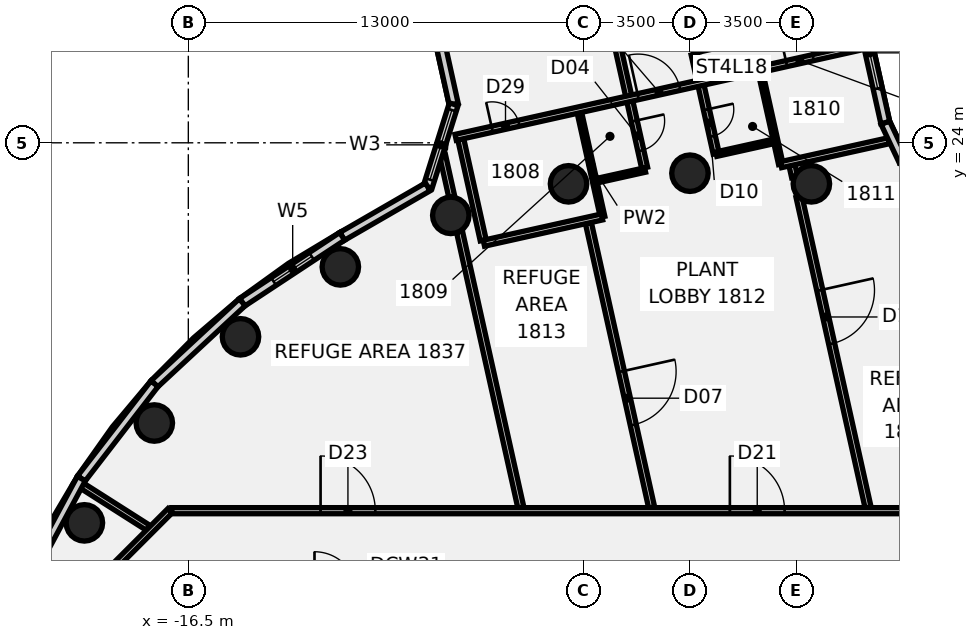
"""IFC4 building model, lengths in metres.
Left out: names, types, materials, properties, quantities, classifications, styles, units other than length and angle.
Written with IfcOpenShell. Run it as: python <this file> out.ifc"""

import sys

from ifc_helpers import new_model, si_unit, direction, frame, frame_2d, origin, origin_2d, place, context, subcontext, project, spatial, rectangle, circle, extrude, element, fill, save


model = new_model("IFC4")
c1 = context("Model", 3, precision=1e-05, world=origin(), true_north=direction((0.0, 1.0)))
c2 = subcontext(c1, "Body", "Model", "MODEL_VIEW")
j1 = project(units=[si_unit("LENGTHUNIT", "METRE"), si_unit("PLANEANGLEUNIT", "RADIAN")], contexts=[c1])
p1 = place(None, origin())
s1 = spatial("IfcSite", under=j1, at=p1, CompositionType="ELEMENT")
p2 = place(p1, origin())
s2 = spatial("IfcBuilding", under=s1, at=p2, CompositionType="ELEMENT")
p3 = place(p2, frame((0.0, 0.0, 79.0)))
s3 = spatial("IfcBuildingStorey", under=s2, at=p3, CompositionType="ELEMENT", Elevation=79.0)
for number, where, z_axis, x_axis in (
    (1, (3.994, 22.651, -0.18), (0.0, 0.0, 1.0), (1.0, 0.0, 0.0)),
    (2, (0.0, 23.0, -0.18), (0.0, 0.0, 1.0), (1.0, 0.0, 0.0)),
    (3, (-3.994, 22.651, -0.18), (0.0, 0.0, 1.0), (1.0, 0.0, 0.0)),
    (4, (-7.866, 21.613, -0.18), (0.0, 0.0, 1.0), (1.0, 0.0, 0.0)),
    (5, (-11.5, 19.919, -0.18), (0.0, 0.0, 1.0), (1.0, 0.0, 0.0)),
    (6, (-14.784, 17.619, -0.18), (0.0, 0.0, 1.0), (1.0, 0.0, 0.0)),
    (7, (-17.619, 14.784, -0.18), (0.0, 0.0, 1.0), (1.0, 0.0, 0.0)),
    (8, (-19.919, 11.5, -0.18), (0.0, 0.0, 1.0), (1.0, 0.0, 0.0)),
):
    element("IfcColumn", number, at=place(p3, frame(where, z_axis=z_axis, x_axis=x_axis)), inside=s3, PredefinedType="COLUMN", context=c2, shape_type="SweptSolid", body=[
        extrude(circle(Radius=0.6, at=origin_2d()), origin(), (0.0, 0.0, 1.0), 4.54),
    ])
p4 = place(p3, frame((-8.14, 23.592, 0.0), z_axis=(0.0, 0.0, 1.0), x_axis=(0.21709529859, -0.976150414296, 0.0)))
e9 = element("IfcWall", 9, at=p4, inside=s3, PredefinedType="PARTITIONING", context=c2, shape_type="SweptSolid", body=[
    extrude(rectangle(XDim=1.411, YDim=0.2, at=frame_2d((0.706, 0.0))), origin(), (0.0, 0.0, 1.0), 3.66),
])
p5 = place(p3, frame((-7.581, 21.079, 0.0), z_axis=(0.0, 0.0, 1.0), x_axis=(0.217055556544, -0.976159252055, 0.0)))
e10 = element("IfcWall", 10, at=p5, inside=s3, PredefinedType="PARTITIONING", context=c2, shape_type="SweptSolid", body=[
    extrude(rectangle(XDim=9.299, YDim=0.2, at=frame_2d((4.649, 0.0))), origin(), (0.0, 0.0, 1.0), 3.66),
])
p6 = place(p3, frame((-7.538, 24.115, 0.0), z_axis=(0.0, 0.0, 1.0), x_axis=(0.216877248521, -0.976198882951, 0.0)))
e11 = element("IfcWall", 11, at=p6, inside=s3, PredefinedType="PARTITIONING", context=c2, shape_type="SweptSolid", body=[
    extrude(rectangle(XDim=3.401, YDim=0.2, at=frame_2d((1.7, 0.0))), origin(), (0.0, 0.0, 1.0), 3.66),
])
p7 = place(p3, frame((-4.905, 38.529, 0.0), z_axis=(0.0, 0.0, 1.0), x_axis=(0.217093198674, -0.976150881314, 0.0)))
e12 = element("IfcWall", 12, at=p7, inside=s3, PredefinedType="PARTITIONING", context=c2, shape_type="SweptSolid", body=[
    extrude(rectangle(XDim=15.725, YDim=0.2, at=frame_2d((7.863, 0.0))), origin(), (0.0, 0.0, 1.0), 3.66),
])
p8 = place(p7, frame((14.15, 0.0, 0.0)))
e13 = element("IfcOpeningElement", 13, at=p8, cuts=e12, PredefinedType="OPENING", context=c2, shape_type="SweptSolid", body=[
    extrude(rectangle(XDim=1.0, YDim=2.1, at=frame_2d((0.5, 1.05))), frame((0.0, 0.11, 0.0), z_axis=(0.0, -1.0, 0.0), x_axis=(1.0, 0.0, 0.0)), (0.0, 0.0, 1.0), 0.22),
])
p9 = place(p7, frame((7.1, 0.0, 0.0)))
e14 = element("IfcOpeningElement", 14, at=p9, cuts=e12, PredefinedType="OPENING", context=c2, shape_type="SweptSolid", body=[
    extrude(rectangle(XDim=1.4, YDim=2.1, at=frame_2d((0.7, 1.05))), frame((0.0, 0.11, 0.0), z_axis=(0.0, -1.0, 0.0), x_axis=(1.0, 0.0, 0.0)), (0.0, 0.0, 1.0), 0.22),
])
p10 = place(p7, frame((2.0, 0.0, 0.0)))
e15 = element("IfcOpeningElement", 15, at=p10, cuts=e12, PredefinedType="OPENING", context=c2, shape_type="SweptSolid", body=[
    extrude(rectangle(XDim=1.4, YDim=2.1, at=frame_2d((0.7, 1.05))), frame((0.0, 0.11, 0.0), z_axis=(0.0, -1.0, 0.0), x_axis=(1.0, 0.0, 0.0)), (0.0, 0.0, 1.0), 0.22),
])
p11 = place(p3, frame((-3.634, 24.982, 0.0), z_axis=(0.0, 0.0, 1.0), x_axis=(0.217211102437, -0.976124652377, 0.0)))
e16 = element("IfcWall", 16, at=p11, inside=s3, PredefinedType="PARTITIONING", context=c2, shape_type="SweptSolid", body=[
    extrude(rectangle(XDim=3.5, YDim=0.15, at=frame_2d((1.75, 0.0))), origin(), (0.0, 0.0, 1.0), 3.66),
])
p12 = place(p3, frame((-3.34, 21.359, 0.0), z_axis=(0.0, 0.0, 1.0), x_axis=(0.217054509475, -0.976159484878, 0.0)))
e17 = element("IfcWall", 17, at=p12, inside=s3, PredefinedType="PARTITIONING", context=c2, shape_type="SweptSolid", body=[
    extrude(rectangle(XDim=9.585, YDim=0.2, at=frame_2d((4.793, 0.0))), origin(), (0.0, 0.0, 1.0), 3.66),
])
p13 = place(p12, frame((5.0, 0.0, 0.0)))
e18 = element("IfcOpeningElement", 18, at=p13, cuts=e17, PredefinedType="OPENING", context=c2, shape_type="SweptSolid", body=[
    extrude(rectangle(XDim=1.8, YDim=2.1, at=frame_2d((0.9, 1.05))), frame((0.0, 0.11, 0.0), z_axis=(0.0, -1.0, 0.0), x_axis=(1.0, 0.0, 0.0)), (0.0, 0.0, 1.0), 0.22),
])
p14 = place(p3, frame((0.138, 26.907, 0.0), z_axis=(0.0, 0.0, 1.0), x_axis=(0.217031075357, -0.976164695289, 0.0)))
e19 = element("IfcWall", 19, at=p14, inside=s3, PredefinedType="PARTITIONING", context=c2, shape_type="SweptSolid", body=[
    extrude(rectangle(XDim=3.34, YDim=0.2, at=frame_2d((1.67, 0.0))), origin(), (0.0, 0.0, 1.0), 3.66),
])
p15 = place(p14, frame((1.86, 0.0, 0.0)))
e20 = element("IfcOpeningElement", 20, at=p15, cuts=e19, PredefinedType="OPENING", context=c2, shape_type="SweptSolid", body=[
    extrude(rectangle(XDim=0.9, YDim=2.1, at=frame_2d((0.45, 1.05))), frame((0.0, 0.11, 0.0), z_axis=(0.0, -1.0, 0.0), x_axis=(1.0, 0.0, 0.0)), (0.0, 0.0, 1.0), 0.22),
])
p16 = place(p3, frame((2.32, 26.311, 0.0), z_axis=(0.0, 0.0, 1.0), x_axis=(0.216662333141, -0.976246604807, 0.0)))
e21 = element("IfcWall", 21, at=p16, inside=s3, PredefinedType="PARTITIONING", context=c2, shape_type="SweptSolid", body=[
    extrude(rectangle(XDim=3.085, YDim=0.15, at=frame_2d((1.542, 0.0))), origin(), (0.0, 0.0, 1.0), 3.66),
])
p17 = place(p3, frame((3.357, 23.258, 0.0), z_axis=(0.0, 0.0, 1.0), x_axis=(0.216995545152, -0.976172594055, 0.0)))
e22 = element("IfcWall", 22, at=p17, inside=s3, PredefinedType="PARTITIONING", context=c2, shape_type="SweptSolid", body=[
    extrude(rectangle(XDim=0.397, YDim=0.2, at=frame_2d((0.199, 0.0))), origin(), (0.0, 0.0, 1.0), 3.66),
])
p18 = place(p3, frame((3.587, 22.225, 0.0), z_axis=(0.0, 0.0, 1.0), x_axis=(0.21703911185, -0.976162908498, 0.0)))
e23 = element("IfcWall", 23, at=p18, inside=s3, PredefinedType="PARTITIONING", context=c2, shape_type="SweptSolid", body=[
    extrude(rectangle(XDim=10.468, YDim=0.2, at=frame_2d((5.234, 0.0))), origin(), (0.0, 0.0, 1.0), 3.66),
])
p19 = place(p18, frame((3.15, 0.0, 0.0)))
e24 = element("IfcOpeningElement", 24, at=p19, cuts=e23, PredefinedType="OPENING", context=c2, shape_type="SweptSolid", body=[
    extrude(rectangle(XDim=1.8, YDim=2.1, at=frame_2d((0.9, 1.05))), frame((0.0, 0.11, 0.0), z_axis=(0.0, -1.0, 0.0), x_axis=(1.0, 0.0, 0.0)), (0.0, 0.0, 1.0), 0.22),
])
p20 = place(p3, frame((-20.233, 12.872, 0.0), z_axis=(0.0, 0.0, 1.0), x_axis=(0.843541681932, -0.537063712089, 0.0)))
e25 = element("IfcWall", 25, at=p20, inside=s3, PredefinedType="PARTITIONING", context=c2, shape_type="SweptSolid", body=[
    extrude(rectangle(XDim=2.854, YDim=0.2, at=frame_2d((1.427, 0.0))), origin(), (0.0, 0.0, 1.0), 3.66),
])
p21 = place(p3, frame((-17.045, 11.9, 0.0), z_axis=(0.0, 0.0, 1.0), x_axis=(1.0, 0.0, 0.0)))
e26 = element("IfcWall", 26, at=p21, inside=s3, PredefinedType="PARTITIONING", context=c2, shape_type="SweptSolid", body=[
    extrude(rectangle(XDim=34.145, YDim=0.2, at=frame_2d((17.073, 0.0))), origin(), (0.0, 0.0, 1.0), 3.66),
])
p22 = place(p21, frame((18.358, 0.0, 0.0)))
e27 = element("IfcOpeningElement", 27, at=p22, cuts=e26, PredefinedType="OPENING", context=c2, shape_type="SweptSolid", body=[
    extrude(rectangle(XDim=1.8, YDim=2.1, at=frame_2d((0.9, 1.05))), frame((0.0, 0.11, 0.0), z_axis=(0.0, -1.0, 0.0), x_axis=(1.0, 0.0, 0.0)), (0.0, 0.0, 1.0), 0.22),
])
p23 = place(p21, frame((28.877, 0.0, 0.0)))
e28 = element("IfcOpeningElement", 28, at=p23, cuts=e26, PredefinedType="OPENING", context=c2, shape_type="SweptSolid", body=[
    extrude(rectangle(XDim=1.8, YDim=2.1, at=frame_2d((0.9, 1.05))), frame((0.0, 0.11, 0.0), z_axis=(0.0, -1.0, 0.0), x_axis=(1.0, 0.0, 0.0)), (0.0, 0.0, 1.0), 0.22),
])
p24 = place(p21, frame((4.895, 0.0, 0.0)))
e29 = element("IfcOpeningElement", 29, at=p24, cuts=e26, PredefinedType="OPENING", context=c2, shape_type="SweptSolid", body=[
    extrude(rectangle(XDim=1.8, YDim=2.1, at=frame_2d((0.9, 1.05))), frame((0.0, 0.11, 0.0), z_axis=(0.0, -1.0, 0.0), x_axis=(1.0, 0.0, 0.0)), (0.0, 0.0, 1.0), 0.22),
])
p25 = place(p3, frame((-7.707, 24.179, 0.0), z_axis=(0.0, 0.0, 1.0), x_axis=(0.976033065583, 0.21762227572, 0.0)))
e30 = element("IfcWall", 30, at=p25, inside=s3, PredefinedType="PARTITIONING", context=c2, shape_type="SweptSolid", body=[
    extrude(rectangle(XDim=13.75, YDim=0.2, at=frame_2d((6.875, 0.0))), origin(), (0.0, 0.0, 1.0), 3.66),
])
p26 = place(p25, frame((6.151, 0.0, 0.0)))
e31 = element("IfcOpeningElement", 31, at=p26, cuts=e30, PredefinedType="OPENING", context=c2, shape_type="SweptSolid", body=[
    extrude(rectangle(XDim=1.4, YDim=2.1, at=frame_2d((0.7, 1.05))), frame((0.0, 0.11, 0.0), z_axis=(0.0, -1.0, 0.0), x_axis=(1.0, 0.0, 0.0)), (0.0, 0.0, 1.0), 0.22),
])
p27 = place(p25, frame((1.23, 0.0, 0.0)))
e32 = element("IfcOpeningElement", 32, at=p27, cuts=e30, PredefinedType="OPENING", context=c2, shape_type="SweptSolid", body=[
    extrude(rectangle(XDim=0.9, YDim=2.1, at=frame_2d((0.45, 1.05))), frame((0.0, 0.11, 0.0), z_axis=(0.0, -1.0, 0.0), x_axis=(1.0, 0.0, 0.0)), (0.0, 0.0, 1.0), 0.22),
])
p28 = place(p25, frame((11.151, 0.0, 0.0)))
e33 = element("IfcOpeningElement", 33, at=p28, cuts=e30, PredefinedType="OPENING", context=c2, shape_type="SweptSolid", body=[
    extrude(rectangle(XDim=0.9, YDim=2.1, at=frame_2d((0.45, 1.05))), frame((0.0, 0.11, 0.0), z_axis=(0.0, -1.0, 0.0), x_axis=(1.0, 0.0, 0.0)), (0.0, 0.0, 1.0), 0.22),
])
p29 = place(p3, frame((-6.779, 20.697, 0.0), z_axis=(0.0, 0.0, 1.0), x_axis=(0.976146636843, 0.217112282887, 0.0)))
e34 = element("IfcWall", 34, at=p29, inside=s3, PredefinedType="PARTITIONING", context=c2, shape_type="SweptSolid", body=[
    extrude(rectangle(XDim=3.981, YDim=0.2, at=frame_2d((1.99, 0.0))), origin(), (0.0, 0.0, 1.0), 3.66),
])
p30 = place(p3, frame((-3.057, 22.754, 0.0), z_axis=(0.0, 0.0, 1.0), x_axis=(0.976179969389, 0.216962363933, 0.0)))
e35 = element("IfcWall", 35, at=p30, inside=s3, PredefinedType="PARTITIONING", context=c2, shape_type="SweptSolid", body=[
    extrude(rectangle(XDim=1.62, YDim=0.15, at=frame_2d((0.81, 0.0))), origin(), (0.0, 0.0, 1.0), 3.66),
])
p31 = place(p3, frame((0.867, 23.627, 0.0), z_axis=(0.0, 0.0, 1.0), x_axis=(0.976187060184, 0.216930457819, 0.0)))
e36 = element("IfcWall", 36, at=p31, inside=s3, PredefinedType="PARTITIONING", context=c2, shape_type="SweptSolid", body=[
    extrude(rectangle(XDim=1.925, YDim=0.15, at=frame_2d((0.962, 0.0))), origin(), (0.0, 0.0, 1.0), 3.66),
])
p32 = place(p3, frame((2.993, 23.28, 0.0), z_axis=(0.0, 0.0, 1.0), x_axis=(0.976190222355, 0.21691622756, 0.0)))
e37 = element("IfcWall", 37, at=p32, inside=s3, PredefinedType="PARTITIONING", context=c2, shape_type="SweptSolid", body=[
    extrude(rectangle(XDim=3.633, YDim=0.2, at=frame_2d((1.816, 0.0))), origin(), (0.0, 0.0, 1.0), 3.66),
])
p33 = place(p3, frame((-18.858, 10.142, 0.0), z_axis=(0.0, 0.0, 1.0), x_axis=(0.707106781187, 0.707106781187, 0.0)))
e38 = element("IfcWall", 38, at=p33, inside=s3, PredefinedType="PARTITIONING", context=c2, shape_type="SweptSolid", body=[
    extrude(rectangle(XDim=2.486, YDim=0.2, at=frame_2d((1.243, 0.0))), origin(), (0.0, 0.0, 1.0), 3.66),
])
p34 = place(p3, frame((7.014, 23.418, 0.0), z_axis=(0.0, 0.0, 1.0), x_axis=(-0.427195365071, 0.904159344398, 0.0)))
e39 = element("IfcWall", 39, at=p34, inside=s3, PredefinedType="SOLIDWALL", context=c2, shape_type="SweptSolid", body=[
    extrude(rectangle(XDim=1.378, YDim=0.3, at=frame_2d((0.689, 0.0))), origin(), (0.0, 0.0, 1.0), 4.36),
])
p35 = place(p3, frame((6.425, 24.665, 0.0), z_axis=(0.0, 0.0, 1.0), x_axis=(-0.217081929523, 0.976153387473, 0.0)))
e40 = element("IfcWall", 40, at=p35, inside=s3, PredefinedType="SOLIDWALL", context=c2, shape_type="SweptSolid", body=[
    extrude(rectangle(XDim=23.892, YDim=0.3, at=frame_2d((11.946, 0.0))), origin(), (0.0, 0.0, 1.0), 4.36),
])
p36 = place(p35, frame((3.852, 0.0, 1.4)))
e41 = element("IfcOpeningElement", 41, at=p36, cuts=e40, PredefinedType="OPENING", context=c2, shape_type="SweptSolid", body=[
    extrude(rectangle(XDim=2.254, YDim=2.6, at=frame_2d((1.127, 1.3))), frame((0.0, 0.16, 0.0), z_axis=(0.0, -1.0, 0.0), x_axis=(1.0, 0.0, 0.0)), (0.0, 0.0, 1.0), 0.32),
])
p37 = place(p35, frame((1.15, 0.0, 1.4)))
e42 = element("IfcOpeningElement", 42, at=p37, cuts=e40, PredefinedType="OPENING", context=c2, shape_type="SweptSolid", body=[
    extrude(rectangle(XDim=2.4, YDim=2.1, at=frame_2d((1.2, 1.05))), frame((0.0, 0.16, 0.0), z_axis=(0.0, -1.0, 0.0), x_axis=(1.0, 0.0, 0.0)), (0.0, 0.0, 1.0), 0.32),
])
p38 = place(p3, frame((-12.135, 45.013, 0.0), z_axis=(0.0, 0.0, 1.0), x_axis=(0.215816840295, -0.976433864348, 0.0)))
e43 = element("IfcWall", 43, at=p38, inside=s3, PredefinedType="SOLIDWALL", context=c2, shape_type="SweptSolid", body=[
    extrude(rectangle(XDim=20.221, YDim=0.3, at=frame_2d((10.11, 0.0))), origin(), (0.0, 0.0, 1.0), 4.36),
])
p39 = place(p38, frame((5.71, 0.0, 1.4)))
e44 = element("IfcOpeningElement", 44, at=p39, cuts=e43, PredefinedType="OPENING", context=c2, shape_type="SweptSolid", body=[
    extrude(rectangle(XDim=2.4, YDim=2.1, at=frame_2d((1.2, 1.05))), frame((0.0, 0.16, 0.0), z_axis=(0.0, -1.0, 0.0), x_axis=(1.0, 0.0, 0.0)), (0.0, 0.0, 1.0), 0.32),
])
p40 = place(p3, frame((-7.771, 25.268, 0.0), z_axis=(0.0, 0.0, 1.0), x_axis=(-0.299577096006, -0.954072095572, 0.0)))
e45 = element("IfcWall", 45, at=p40, inside=s3, PredefinedType="SOLIDWALL", context=c2, shape_type="SweptSolid", body=[
    extrude(rectangle(XDim=2.85, YDim=0.3, at=frame_2d((1.425, 0.0))), origin(), (0.0, 0.0, 1.0), 4.36),
])
p41 = place(p40, frame((0.2, 0.0, 1.4)))
e46 = element("IfcOpeningElement", 46, at=p41, cuts=e45, PredefinedType="OPENING", context=c2, shape_type="SweptSolid", body=[
    extrude(rectangle(XDim=2.4, YDim=2.1, at=frame_2d((1.2, 1.05))), frame((0.0, 0.16, 0.0), z_axis=(0.0, -1.0, 0.0), x_axis=(1.0, 0.0, 0.0)), (0.0, 0.0, 1.0), 0.32),
])
p42 = place(p3, frame((-8.625, 22.549, 0.0), z_axis=(0.0, 0.0, 1.0), x_axis=(-0.86583904671, -0.500322641095, 0.0)))
e47 = element("IfcWall", 47, at=p42, inside=s3, PredefinedType="SOLIDWALL", context=c2, shape_type="SweptSolid", body=[
    extrude(rectangle(XDim=3.251, YDim=0.3, at=frame_2d((1.625, 0.0))), origin(), (0.0, 0.0, 1.0), 4.36),
])
p43 = place(p3, frame((-11.439, 20.923, 0.0), z_axis=(0.0, 0.0, 1.0), x_axis=(-0.834786621205, -0.550573607302, 0.0)))
e48 = element("IfcWall", 48, at=p43, inside=s3, PredefinedType="SOLIDWALL", context=c2, shape_type="SweptSolid", body=[
    extrude(rectangle(XDim=3.938, YDim=0.3, at=frame_2d((1.969, 0.0))), origin(), (0.0, 0.0, 1.0), 4.36),
])
p44 = place(p43, frame((1.2, 0.0, 1.4)))
e49 = element("IfcOpeningElement", 49, at=p44, cuts=e48, PredefinedType="OPENING", context=c2, shape_type="SweptSolid", body=[
    extrude(rectangle(XDim=1.5, YDim=1.0, at=frame_2d((0.75, 0.5))), frame((0.0, 0.16, 0.0), z_axis=(0.0, -1.0, 0.0), x_axis=(1.0, 0.0, 0.0)), (0.0, 0.0, 1.0), 0.32),
])
p45 = place(p3, frame((-14.727, 18.754, 0.0), z_axis=(0.0, 0.0, 1.0), x_axis=(-0.732813362883, -0.680429698926, 0.0)))
e50 = element("IfcWall", 50, at=p45, inside=s3, PredefinedType="SOLIDWALL", context=c2, shape_type="SweptSolid", body=[
    extrude(rectangle(XDim=3.938, YDim=0.3, at=frame_2d((1.969, 0.0))), origin(), (0.0, 0.0, 1.0), 4.36),
])
p46 = place(p3, frame((-17.613, 16.075, 0.0), z_axis=(0.0, 0.0, 1.0), x_axis=(-0.610785688376, -0.79179596038, 0.0)))
e51 = element("IfcWall", 51, at=p46, inside=s3, PredefinedType="SOLIDWALL", context=c2, shape_type="SweptSolid", body=[
    extrude(rectangle(XDim=3.938, YDim=0.3, at=frame_2d((1.969, 0.0))), origin(), (0.0, 0.0, 1.0), 4.36),
])
p47 = place(p3, frame((-20.019, 12.956, 0.0), z_axis=(0.0, 0.0, 1.0), x_axis=(-0.472144036007, -0.881521417359, 0.0)))
e52 = element("IfcWall", 52, at=p47, inside=s3, PredefinedType="SOLIDWALL", context=c2, shape_type="SweptSolid", body=[
    extrude(rectangle(XDim=3.94, YDim=0.3, at=frame_2d((1.97, 0.0))), origin(), (0.0, 0.0, 1.0), 4.36),
])
p48 = place(p3, frame((0.227, 26.968, -0.18), z_axis=(0.0, 0.0, 1.0), x_axis=(-0.217065493376, 0.976157042481, 0.0)))
e53 = element("IfcWall", 53, at=p48, inside=s3, PredefinedType="SHEAR", context=c2, shape_type="SweptSolid", body=[
    extrude(rectangle(XDim=6.7, YDim=0.2, at=frame_2d((3.35, 0.0))), origin(), (0.0, 0.0, 1.0), 3.94),
])
p49 = place(p48, frame((0.35, 0.0, 0.0)))
e54 = element("IfcOpeningElement", 54, at=p49, cuts=e53, PredefinedType="OPENING", context=c2, shape_type="SweptSolid", body=[
    extrude(rectangle(XDim=1.0, YDim=2.1, at=frame_2d((0.5, 1.05))), frame((0.0, 0.11, 0.0), z_axis=(0.0, -1.0, 0.0), x_axis=(1.0, 0.0, 0.0)), (0.0, 0.0, 1.0), 0.22),
])
p50 = place(p8, frame((1.0, 0.0, 0.0), z_axis=(0.0, 0.0, 1.0), x_axis=(-1.0, 0.0, 0.0)))
e55 = element("IfcDoor", 55, at=p50, inside=s3, OperationType="SINGLE_SWING_RIGHT", PredefinedType="DOOR", context=c2, shape_type="SweptSolid", body=[
    extrude(rectangle(XDim=1.0, YDim=2.1, at=frame_2d((0.5, 1.05))), frame((0.0, 0.025, 0.0), z_axis=(0.0, -1.0, 0.0), x_axis=(1.0, 0.0, 0.0)), (0.0, 0.0, 1.0), 0.05),
])
fill(e13, e55)
p51 = place(p13, frame((1.8, 0.0, 0.0), z_axis=(0.0, 0.0, 1.0), x_axis=(-1.0, 0.0, 0.0)))
e56 = element("IfcDoor", 56, at=p51, inside=s3, OperationType="DOUBLE_DOOR_SINGLE_SWING", PredefinedType="DOOR", context=c2, shape_type="SweptSolid", body=[
    extrude(rectangle(XDim=1.8, YDim=2.1, at=frame_2d((0.9, 1.05))), frame((0.0, 0.025, 0.0), z_axis=(0.0, -1.0, 0.0), x_axis=(1.0, 0.0, 0.0)), (0.0, 0.0, 1.0), 0.05),
])
fill(e18, e56)
p52 = place(p15, origin())
e57 = element("IfcDoor", 57, at=p52, inside=s3, OperationType="SINGLE_SWING_LEFT", PredefinedType="DOOR", context=c2, shape_type="SweptSolid", body=[
    extrude(rectangle(XDim=0.9, YDim=2.1, at=frame_2d((0.45, 1.05))), frame((0.0, 0.025, 0.0), z_axis=(0.0, -1.0, 0.0), x_axis=(1.0, 0.0, 0.0)), (0.0, 0.0, 1.0), 0.05),
])
fill(e20, e57)
p53 = place(p19, origin())
e58 = element("IfcDoor", 58, at=p53, inside=s3, OperationType="DOUBLE_DOOR_SINGLE_SWING", PredefinedType="DOOR", context=c2, shape_type="SweptSolid", body=[
    extrude(rectangle(XDim=1.8, YDim=2.1, at=frame_2d((0.9, 1.05))), frame((0.0, 0.025, 0.0), z_axis=(0.0, -1.0, 0.0), x_axis=(1.0, 0.0, 0.0)), (0.0, 0.0, 1.0), 0.05),
])
fill(e24, e58)
p54 = place(p22, frame((1.8, 0.0, 0.0), z_axis=(0.0, 0.0, 1.0), x_axis=(-1.0, 0.0, 0.0)))
e59 = element("IfcDoor", 59, at=p54, inside=s3, OperationType="DOUBLE_DOOR_SINGLE_SWING", PredefinedType="DOOR", context=c2, shape_type="SweptSolid", body=[
    extrude(rectangle(XDim=1.8, YDim=2.1, at=frame_2d((0.9, 1.05))), frame((0.0, 0.025, 0.0), z_axis=(0.0, -1.0, 0.0), x_axis=(1.0, 0.0, 0.0)), (0.0, 0.0, 1.0), 0.05),
])
fill(e27, e59)
p55 = place(p24, origin())
e60 = element("IfcDoor", 60, at=p55, inside=s3, OperationType="DOUBLE_DOOR_SINGLE_SWING", PredefinedType="DOOR", context=c2, shape_type="SweptSolid", body=[
    extrude(rectangle(XDim=1.8, YDim=2.1, at=frame_2d((0.9, 1.05))), frame((0.0, 0.025, 0.0), z_axis=(0.0, -1.0, 0.0), x_axis=(1.0, 0.0, 0.0)), (0.0, 0.0, 1.0), 0.05),
])
fill(e29, e60)
p56 = place(p26, frame((1.4, 0.0, 0.0), z_axis=(0.0, 0.0, 1.0), x_axis=(-1.0, 0.0, 0.0)))
e61 = element("IfcDoor", 61, at=p56, inside=s3, OperationType="DOUBLE_DOOR_SINGLE_SWING", PredefinedType="DOOR", context=c2, shape_type="SweptSolid", body=[
    extrude(rectangle(XDim=1.4, YDim=2.1, at=frame_2d((0.7, 1.05))), frame((0.0, 0.025, 0.0), z_axis=(0.0, -1.0, 0.0), x_axis=(1.0, 0.0, 0.0)), (0.0, 0.0, 1.0), 0.05),
])
fill(e31, e61)
p57 = place(p27, frame((0.9, 0.0, 0.0), z_axis=(0.0, 0.0, 1.0), x_axis=(-1.0, 0.0, 0.0)))
e62 = element("IfcDoor", 62, at=p57, inside=s3, OperationType="SINGLE_SWING_LEFT", PredefinedType="DOOR", context=c2, shape_type="SweptSolid", body=[
    extrude(rectangle(XDim=0.9, YDim=2.1, at=frame_2d((0.45, 1.05))), frame((0.0, 0.025, 0.0), z_axis=(0.0, -1.0, 0.0), x_axis=(1.0, 0.0, 0.0)), (0.0, 0.0, 1.0), 0.05),
])
fill(e32, e62)
p58 = place(p28, frame((0.9, 0.0, 0.0), z_axis=(0.0, 0.0, 1.0), x_axis=(-1.0, 0.0, 0.0)))
e63 = element("IfcDoor", 63, at=p58, inside=s3, OperationType="SINGLE_SWING_RIGHT", PredefinedType="DOOR", context=c2, shape_type="SweptSolid", body=[
    extrude(rectangle(XDim=0.9, YDim=2.1, at=frame_2d((0.45, 1.05))), frame((0.0, 0.025, 0.0), z_axis=(0.0, -1.0, 0.0), x_axis=(1.0, 0.0, 0.0)), (0.0, 0.0, 1.0), 0.05),
])
fill(e33, e63)
p59 = place(p37, origin())
e64 = element("IfcWindow", 64, at=p59, inside=s3, PartitioningType="SINGLE_PANEL", PredefinedType="WINDOW", context=c2, shape_type="SweptSolid", body=[
    extrude(rectangle(XDim=2.4, YDim=2.1, at=frame_2d((1.2, 1.05))), frame((0.0, 0.03, 0.0), z_axis=(0.0, -1.0, 0.0), x_axis=(1.0, 0.0, 0.0)), (0.0, 0.0, 1.0), 0.06),
])
fill(e42, e64)
p60 = place(p41, origin())
e65 = element("IfcWindow", 65, at=p60, inside=s3, PartitioningType="SINGLE_PANEL", PredefinedType="WINDOW", context=c2, shape_type="SweptSolid", body=[
    extrude(rectangle(XDim=2.4, YDim=2.1, at=frame_2d((1.2, 1.05))), frame((0.0, 0.03, 0.0), z_axis=(0.0, -1.0, 0.0), x_axis=(1.0, 0.0, 0.0)), (0.0, 0.0, 1.0), 0.06),
])
fill(e46, e65)
p61 = place(p44, origin())
e66 = element("IfcWindow", 66, at=p61, inside=s3, PartitioningType="SINGLE_PANEL", PredefinedType="WINDOW", context=c2, shape_type="SweptSolid", body=[
    extrude(rectangle(XDim=1.5, YDim=1.0, at=frame_2d((0.75, 0.5))), frame((0.0, 0.03, 0.0), z_axis=(0.0, -1.0, 0.0), x_axis=(1.0, 0.0, 0.0)), (0.0, 0.0, 1.0), 0.06),
])
fill(e49, e66)
save(model, sys.argv[1])
